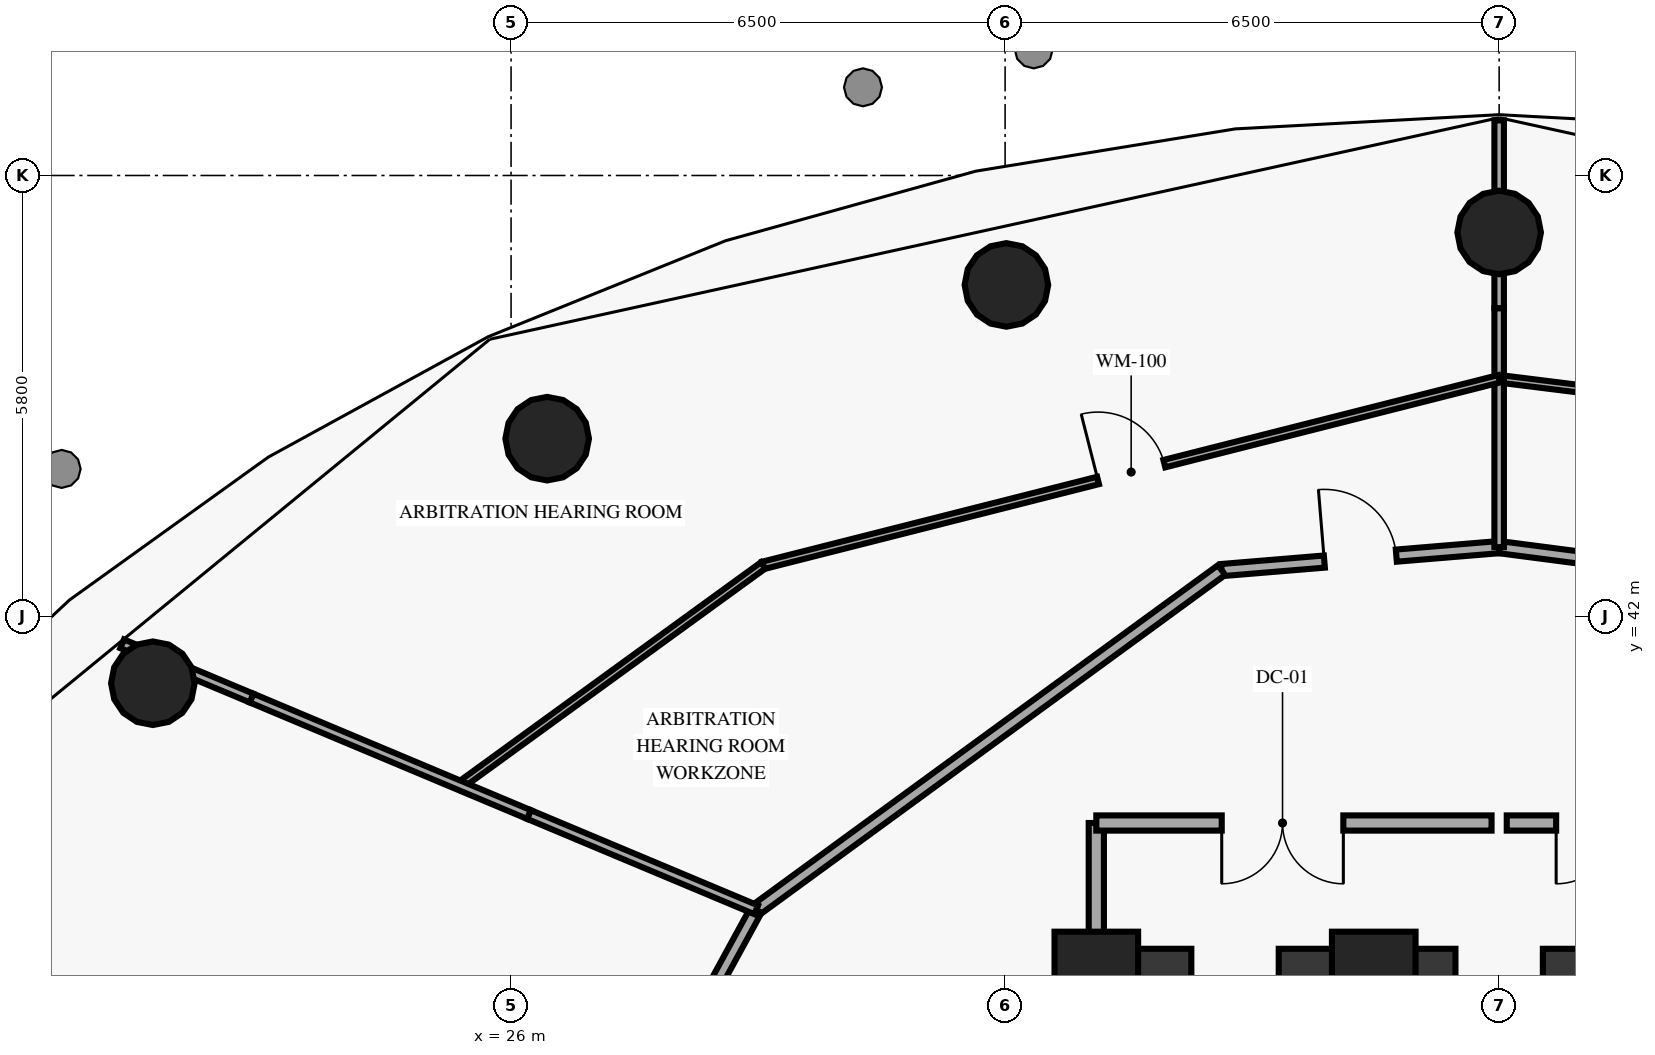
"""IFC4 building model, lengths in metres.
Left out: names, types, materials, properties, quantities, classifications, styles, units other than length and angle.
Written with IfcOpenShell. Run it as: python <this file> out.ifc"""

import sys

from ifc_helpers import new_model, si_unit, direction, frame, frame_2d, origin, origin_2d, place, context, subcontext, project, spatial, rectangle, circle, extrude, element, fill, save


model = new_model("IFC4")
c1 = context("Model", 3, precision=1e-05, world=origin(), true_north=direction((0.0, 1.0)))
c2 = subcontext(c1, "Body", "Model", "MODEL_VIEW")
j1 = project(units=[si_unit("LENGTHUNIT", "METRE"), si_unit("PLANEANGLEUNIT", "RADIAN")], contexts=[c1])
p1 = place(None, origin())
s1 = spatial("IfcSite", under=j1, at=p1, CompositionType="ELEMENT")
p2 = place(p1, origin())
s2 = spatial("IfcBuilding", under=s1, at=p2, CompositionType="ELEMENT")
p3 = place(p2, frame((0.0, 0.0, 53.4)))
s3 = spatial("IfcBuildingStorey", under=s2, at=p3, CompositionType="ELEMENT", Elevation=53.4)
for number, where, z_axis, x_axis in (
    (1, (37.35, 37.3, 0.0), (0.0, 0.0, 1.0), (1.0, 0.0, 0.0)),
    (2, (33.7, 37.3, 0.0), (0.0, 0.0, 1.0), (1.0, 0.0, 0.0)),
):
    element("IfcColumn", number, at=place(p3, frame(where, z_axis=z_axis, x_axis=x_axis)), inside=s3, PredefinedType="PILASTER", context=c2, shape_type="SweptSolid", body=[
        extrude(rectangle(XDim=1.1, YDim=1.1, at=origin_2d()), origin(), (0.0, 0.0, 1.0), 3.8),
    ])
for number, where, z_axis, x_axis in (
    (3, (39.0, 47.05, 0.0), (0.0, 0.0, 1.0), (1.0, 0.0, 0.0)),
    (4, (32.517, 46.36, 0.0), (0.0, 0.0, 1.0), (1.0, 0.0, 0.0)),
    (5, (26.475, 44.337, 0.0), (0.0, 0.0, 1.0), (1.0, 0.0, 0.0)),
    (6, (21.287, 41.119, 0.0), (0.0, 0.0, 1.0), (1.0, 0.0, 0.0)),
):
    element("IfcColumn", number, at=place(p3, frame(where, z_axis=z_axis, x_axis=x_axis)), inside=s3, PredefinedType="COLUMN", context=c2, shape_type="SweptSolid", body=[
        extrude(circle(Radius=0.55, at=origin_2d()), origin(), (0.0, 0.0, 1.0), 3.8),
    ])
p4 = place(p3, frame((33.7, 29.05, 0.0), z_axis=(0.0, 0.0, 1.0), x_axis=(0.0, 1.0, 0.0)))
e7 = element("IfcWall", 7, at=p4, inside=s3, PredefinedType="SHEAR", context=c2, shape_type="SweptSolid", body=[
    extrude(rectangle(XDim=8.35, YDim=0.8, at=frame_2d((4.175, 0.0))), origin(), (0.0, 0.0, 1.0), 3.8),
])
p5 = place(p3, frame((37.35, 37.4, 0.0), z_axis=(0.0, 0.0, 1.0), x_axis=(-1.0, 0.0, 0.0)))
e8 = element("IfcWall", 8, at=p5, inside=s3, PredefinedType="SHEAR", context=c2, shape_type="SweptSolid", body=[
    extrude(rectangle(XDim=3.65, YDim=0.45, at=frame_2d((1.825, 0.0))), origin(), (0.0, 0.0, 1.0), 3.8),
])
p6 = place(p5, frame((1.25, 0.0, 0.0)))
e9 = element("IfcOpeningElement", 9, at=p6, cuts=e8, PredefinedType="OPENING", context=c2, shape_type="SweptSolid", body=[
    extrude(rectangle(XDim=1.15, YDim=2.15, at=frame_2d((0.575, 1.075))), frame((0.0, 0.235, 0.0), z_axis=(0.0, -1.0, 0.0), x_axis=(1.0, 0.0, 0.0)), (0.0, 0.0, 1.0), 0.47),
])
p7 = place(p3, frame((37.35, 29.05, 0.0), z_axis=(0.0, 0.0, 1.0), x_axis=(0.0, 1.0, 0.0)))
e10 = element("IfcWall", 10, at=p7, inside=s3, PredefinedType="SHEAR", context=c2, shape_type="SweptSolid", body=[
    extrude(rectangle(XDim=8.35, YDim=0.45, at=frame_2d((4.175, 0.0))), origin(), (0.0, 0.0, 1.0), 3.8),
])
p8 = place(p3, frame((40.65, 37.4, 0.0), z_axis=(0.0, 0.0, 1.0), x_axis=(-1.0, 0.0, 0.0)))
e11 = element("IfcWall", 11, at=p8, inside=s3, PredefinedType="SHEAR", context=c2, shape_type="SweptSolid", body=[
    extrude(rectangle(XDim=3.3, YDim=0.45, at=frame_2d((1.65, 0.0))), origin(), (0.0, 0.0, 1.0), 3.8),
])
p9 = place(p8, frame((1.075, 0.0, 0.0)))
e12 = element("IfcOpeningElement", 12, at=p9, cuts=e11, PredefinedType="OPENING", context=c2, shape_type="SweptSolid", body=[
    extrude(rectangle(XDim=1.15, YDim=2.15, at=frame_2d((0.575, 1.075))), frame((0.0, 0.235, 0.0), z_axis=(0.0, -1.0, 0.0), x_axis=(1.0, 0.0, 0.0)), (0.0, 0.0, 1.0), 0.47),
])
p10 = place(p3, frame((33.7, 37.4, 0.0), z_axis=(0.0, 0.0, 1.0), x_axis=(0.0, 1.0, 0.0)))
e13 = element("IfcWall", 13, at=p10, inside=s3, PredefinedType="SOLIDWALL", context=c2, shape_type="SweptSolid", body=[
    extrude(rectangle(XDim=1.88, YDim=0.2, at=frame_2d((0.94, 0.0))), origin(), (0.0, 0.0, 1.0), 3.8),
])
p11 = place(p3, frame((38.9, 39.28, 0.0), z_axis=(0.0, 0.0, 1.0), x_axis=(-1.0, 0.0, 0.0)))
e14 = element("IfcWall", 14, at=p11, inside=s3, PredefinedType="SOLIDWALL", context=c2, shape_type="SweptSolid", body=[
    extrude(rectangle(XDim=5.2, YDim=0.2, at=frame_2d((2.6, 0.0))), origin(), (0.0, 0.0, 1.0), 3.8),
])
p12 = place(p11, frame((1.95, 0.0, 0.0)))
e15 = element("IfcOpeningElement", 15, at=p12, cuts=e14, PredefinedType="OPENING", context=c2, shape_type="SweptSolid", body=[
    extrude(rectangle(XDim=1.6, YDim=2.2, at=frame_2d((0.8, 1.1))), frame((0.0, 0.11, 0.0), z_axis=(0.0, -1.0, 0.0), x_axis=(1.0, 0.0, 0.0)), (0.0, 0.0, 1.0), 0.22),
])
p13 = place(p3, frame((45.7, 39.28, 0.0), z_axis=(0.0, 0.0, 1.0), x_axis=(-1.0, 0.0, 0.0)))
e16 = element("IfcWall", 16, at=p13, inside=s3, PredefinedType="SOLIDWALL", context=c2, shape_type="SweptSolid", body=[
    extrude(rectangle(XDim=6.6, YDim=0.2, at=frame_2d((3.3, 0.0))), origin(), (0.0, 0.0, 1.0), 3.8),
])
p14 = place(p13, frame((4.35, 0.0, 0.0)))
e17 = element("IfcOpeningElement", 17, at=p14, cuts=e16, PredefinedType="OPENING", context=c2, shape_type="SweptSolid", body=[
    extrude(rectangle(XDim=1.6, YDim=2.2, at=frame_2d((0.8, 1.1))), frame((0.0, 0.11, 0.0), z_axis=(0.0, -1.0, 0.0), x_axis=(1.0, 0.0, 0.0)), (0.0, 0.0, 1.0), 0.22),
])
p15 = place(p3, frame((46.53, 41.929, 0.0), z_axis=(0.0, 0.0, 1.0), x_axis=(-0.99162101561, 0.129181118592, 0.0)))
e18 = element("IfcWall", 18, at=p15, inside=s3, PredefinedType="PARTITIONING", context=c2, shape_type="SweptSolid", body=[
    extrude(rectangle(XDim=7.594, YDim=0.16, at=frame_2d((3.797, 0.0))), origin(), (0.0, 0.0, 1.0), 3.8),
])
p16 = place(p3, frame((35.348, 42.608, 0.0), z_axis=(0.0, 0.0, 1.0), x_axis=(0.996598394666, 0.082411405455, 0.0)))
e19 = element("IfcWall", 19, at=p16, inside=s3, PredefinedType="PARTITIONING", context=c2, shape_type="SweptSolid", body=[
    extrude(rectangle(XDim=3.665, YDim=0.16, at=frame_2d((1.832, 0.0))), origin(), (0.0, 0.0, 1.0), 3.8),
])
p17 = place(p16, frame((1.357, 0.0, 0.0)))
e20 = element("IfcOpeningElement", 20, at=p17, cuts=e19, PredefinedType="OPENING", context=c2, shape_type="SweptSolid", body=[
    extrude(rectangle(XDim=0.95, YDim=2.15, at=frame_2d((0.475, 1.075))), frame((0.0, 0.09, 0.0), z_axis=(0.0, -1.0, 0.0), x_axis=(1.0, 0.0, 0.0)), (0.0, 0.0, 1.0), 0.18),
])
p18 = place(p3, frame((35.348, 42.608, 0.0), z_axis=(0.0, 0.0, 1.0), x_axis=(-0.807666592587, -0.589639445101, 0.0)))
e21 = element("IfcWall", 21, at=p18, inside=s3, PredefinedType="PARTITIONING", context=c2, shape_type="SweptSolid", body=[
    extrude(rectangle(XDim=7.581, YDim=0.16, at=frame_2d((3.791, 0.0))), origin(), (0.0, 0.0, 1.0), 3.8),
])
p19 = place(p3, frame((27.309, 34.63, 0.0), z_axis=(0.0, 0.0, 1.0), x_axis=(0.479339902436, 0.877629339717, 0.0)))
e22 = element("IfcWall", 22, at=p19, inside=s3, PredefinedType="PARTITIONING", context=c2, shape_type="SweptSolid", body=[
    extrude(rectangle(XDim=3.997, YDim=0.16, at=frame_2d((1.999, 0.0))), origin(), (0.0, 0.0, 1.0), 3.8),
])
p20 = place(p19, frame((1.524, 0.0, 0.0)))
e23 = element("IfcOpeningElement", 23, at=p20, cuts=e22, PredefinedType="OPENING", context=c2, shape_type="SweptSolid", body=[
    extrude(rectangle(XDim=0.95, YDim=2.15, at=frame_2d((0.475, 1.075))), frame((0.0, 0.09, 0.0), z_axis=(0.0, -1.0, 0.0), x_axis=(1.0, 0.0, 0.0)), (0.0, 0.0, 1.0), 0.18),
])
p21 = place(p3, frame((44.013, 44.501, 0.0), z_axis=(0.0, 0.0, 1.0), x_axis=(-0.992340947468, 0.123529121985, 0.0)))
e24 = element("IfcWall", 24, at=p21, inside=s3, PredefinedType="MOVABLE", context=c2, shape_type="SweptSolid", body=[
    extrude(rectangle(XDim=5.052, YDim=0.1, at=frame_2d((2.526, 0.0))), origin(), (0.0, 0.0, 1.0), 3.8),
])
p22 = place(p3, frame((39.0, 42.91, 0.0), z_axis=(0.0, 0.0, 1.0), x_axis=(0.0, 1.0, 0.0)))
e25 = element("IfcWall", 25, at=p22, inside=s3, PredefinedType="PARTITIONING", context=c2, shape_type="SweptSolid", body=[
    extrude(rectangle(XDim=2.215, YDim=0.125, at=frame_2d((1.107, 0.0))), origin(), (0.0, 0.0, 1.0), 3.8),
])
p23 = place(p3, frame((39.0, 45.125, 0.0), z_axis=(0.0, 0.0, 1.0), x_axis=(0.0, 1.0, 0.0)))
e26 = element("IfcWall", 26, at=p23, inside=s3, PredefinedType="PARTITIONING", context=c2, shape_type="SweptSolid", body=[
    extrude(rectangle(XDim=0.929, YDim=0.125, at=frame_2d((0.464, 0.0))), origin(), (0.0, 0.0, 1.0), 3.8),
])
p24 = place(p3, frame((39.0, 46.054, 0.0), z_axis=(0.0, 0.0, 1.0), x_axis=(0.0, 1.0, 0.0)))
e27 = element("IfcWall", 27, at=p24, inside=s3, PredefinedType="PARTITIONING", context=c2, shape_type="SweptSolid", body=[
    extrude(rectangle(XDim=1.007, YDim=0.125, at=frame_2d((0.503, 0.0))), origin(), (0.0, 0.0, 1.0), 3.265),
])
p25 = place(p3, frame((39.0, 47.061, 0.0), z_axis=(0.0, 0.0, 1.0), x_axis=(0.0, 1.0, 0.0)))
e28 = element("IfcWall", 28, at=p25, inside=s3, PredefinedType="PARTITIONING", context=c2, shape_type="SweptSolid", body=[
    extrude(rectangle(XDim=1.464, YDim=0.125, at=frame_2d((0.732, 0.0))), origin(), (0.0, 0.0, 1.0), 3.8),
])
p26 = place(p3, frame((29.317, 42.67, 0.0), z_axis=(0.0, 0.0, 1.0), x_axis=(0.969329167934, 0.245766076162, 0.0)))
e29 = element("IfcWall", 29, at=p26, inside=s3, PredefinedType="MOVABLE", context=c2, shape_type="SweptSolid", body=[
    extrude(rectangle(XDim=9.99, YDim=0.1, at=frame_2d((4.995, 0.0))), origin(), (0.0, 0.0, 1.0), 3.8),
])
p27 = place(p26, frame((4.545, 0.0, 0.0)))
e30 = element("IfcOpeningElement", 30, at=p27, cuts=e29, PredefinedType="OPENING", context=c2, shape_type="SweptSolid", body=[
    extrude(rectangle(XDim=0.9, YDim=2.1, at=frame_2d((0.45, 1.05))), frame((0.0, 0.06, 0.0), z_axis=(0.0, -1.0, 0.0), x_axis=(1.0, 0.0, 0.0)), (0.0, 0.0, 1.0), 0.12),
])
p28 = place(p3, frame((29.317, 42.67, 0.0), z_axis=(0.0, 0.0, 1.0), x_axis=(-0.809304329507, -0.587389565997, 0.0)))
e31 = element("IfcWall", 31, at=p28, inside=s3, PredefinedType="MOVABLE", context=c2, shape_type="SweptSolid", body=[
    extrude(rectangle(XDim=4.957, YDim=0.1, at=frame_2d((2.479, 0.0))), origin(), (0.0, 0.0, 1.0), 3.8),
])
p29 = place(p3, frame((29.225, 38.138, 0.0), z_axis=(0.0, 0.0, 1.0), x_axis=(-0.92216319385, 0.386801039177, 0.0)))
e32 = element("IfcWall", 32, at=p29, inside=s3, PredefinedType="PARTITIONING", context=c2, shape_type="SweptSolid", body=[
    extrude(rectangle(XDim=3.242, YDim=0.125, at=frame_2d((1.621, 0.0))), origin(), (0.0, 0.0, 1.0), 3.8),
])
p30 = place(p3, frame((26.235, 39.392, 0.0), z_axis=(0.0, 0.0, 1.0), x_axis=(-0.922079399294, 0.387000751159, 0.0)))
e33 = element("IfcWall", 33, at=p30, inside=s3, PredefinedType="PARTITIONING", context=c2, shape_type="SweptSolid", body=[
    extrude(rectangle(XDim=3.958, YDim=0.125, at=frame_2d((1.979, 0.0))), origin(), (0.0, 0.0, 1.0), 3.02),
])
p31 = place(p3, frame((22.585, 40.924, 0.0), z_axis=(0.0, 0.0, 1.0), x_axis=(-0.922162419432, 0.386802885443, 0.0)))
e34 = element("IfcWall", 34, at=p31, inside=s3, PredefinedType="PARTITIONING", context=c2, shape_type="SweptSolid", body=[
    extrude(rectangle(XDim=1.845, YDim=0.125, at=frame_2d((0.923, 0.0))), origin(), (0.0, 0.0, 1.0), 3.8),
])
p32 = place(p6, origin())
e35 = element("IfcDoor", 35, at=p32, inside=s3, OperationType="SINGLE_SWING_RIGHT", PredefinedType="DOOR", context=c2, shape_type="SweptSolid", body=[
    extrude(rectangle(XDim=1.15, YDim=2.15, at=frame_2d((0.575, 1.075))), frame((0.0, 0.025, 0.0), z_axis=(0.0, -1.0, 0.0), x_axis=(1.0, 0.0, 0.0)), (0.0, 0.0, 1.0), 0.05),
])
fill(e9, e35)
p33 = place(p9, origin())
e36 = element("IfcDoor", 36, at=p33, inside=s3, OperationType="SINGLE_SWING_RIGHT", PredefinedType="DOOR", context=c2, shape_type="SweptSolid", body=[
    extrude(rectangle(XDim=1.15, YDim=2.15, at=frame_2d((0.575, 1.075))), frame((0.0, 0.025, 0.0), z_axis=(0.0, -1.0, 0.0), x_axis=(1.0, 0.0, 0.0)), (0.0, 0.0, 1.0), 0.05),
])
fill(e12, e36)
p34 = place(p12, origin())
e37 = element("IfcDoor", 37, at=p34, inside=s3, OperationType="DOUBLE_DOOR_SINGLE_SWING", PredefinedType="DOOR", context=c2, shape_type="SweptSolid", body=[
    extrude(rectangle(XDim=1.6, YDim=2.2, at=frame_2d((0.8, 1.1))), frame((0.0, 0.025, 0.0), z_axis=(0.0, -1.0, 0.0), x_axis=(1.0, 0.0, 0.0)), (0.0, 0.0, 1.0), 0.05),
])
fill(e15, e37)
p35 = place(p14, origin())
e38 = element("IfcDoor", 38, at=p35, inside=s3, OperationType="DOUBLE_DOOR_SINGLE_SWING", PredefinedType="DOOR", context=c2, shape_type="SweptSolid", body=[
    extrude(rectangle(XDim=1.6, YDim=2.2, at=frame_2d((0.8, 1.1))), frame((0.0, 0.025, 0.0), z_axis=(0.0, -1.0, 0.0), x_axis=(1.0, 0.0, 0.0)), (0.0, 0.0, 1.0), 0.05),
])
fill(e17, e38)
p36 = place(p17, origin())
e39 = element("IfcDoor", 39, at=p36, inside=s3, OperationType="SINGLE_SWING_LEFT", PredefinedType="DOOR", context=c2, shape_type="SweptSolid", body=[
    extrude(rectangle(XDim=0.95, YDim=2.15, at=frame_2d((0.475, 1.075))), frame((0.0, 0.025, 0.0), z_axis=(0.0, -1.0, 0.0), x_axis=(1.0, 0.0, 0.0)), (0.0, 0.0, 1.0), 0.05),
])
fill(e20, e39)
p37 = place(p27, origin())
e40 = element("IfcDoor", 40, at=p37, inside=s3, OperationType="SINGLE_SWING_LEFT", PredefinedType="DOOR", context=c2, shape_type="SweptSolid", body=[
    extrude(rectangle(XDim=0.9, YDim=2.1, at=frame_2d((0.45, 1.05))), frame((0.0, 0.025, 0.0), z_axis=(0.0, -1.0, 0.0), x_axis=(1.0, 0.0, 0.0)), (0.0, 0.0, 1.0), 0.05),
])
fill(e30, e40)
save(model, sys.argv[1])
